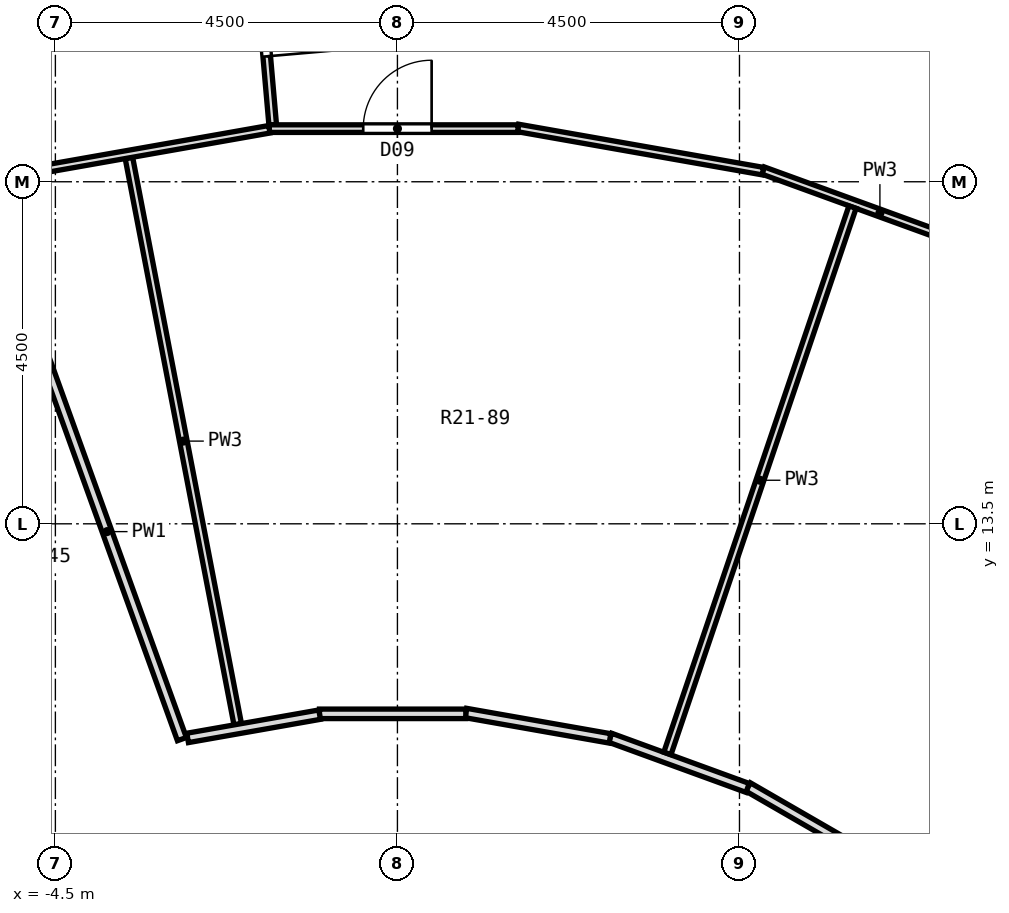
"""IFC4 building model, lengths in metres.
Left out: names, types, materials, properties, quantities, classifications, styles, units other than length and angle.
Written with IfcOpenShell. Run it as: python <this file> out.ifc"""

import sys

from ifc_helpers import new_model, si_unit, direction, frame, frame_2d, origin, place, context, subcontext, project, spatial, rectangle, extrude, element, fill, save


model = new_model("IFC4")
c1 = context("Model", 3, precision=1e-05, world=origin(), true_north=direction((0.0, 1.0)))
c2 = subcontext(c1, "Body", "Model", "MODEL_VIEW")
j1 = project(units=[si_unit("LENGTHUNIT", "METRE"), si_unit("PLANEANGLEUNIT", "RADIAN")], contexts=[c1])
p1 = place(None, origin())
s1 = spatial("IfcSite", under=j1, at=p1, CompositionType="ELEMENT")
p2 = place(p1, origin())
s2 = spatial("IfcBuilding", under=s1, at=p2, CompositionType="ELEMENT")
p3 = place(p2, frame((0.0, 0.0, 131.5)))
s3 = spatial("IfcBuildingStorey", under=s2, at=p3, CompositionType="ELEMENT", Elevation=131.5)
p4 = place(p3, frame((-2.237, 25.567, 0.0), z_axis=(0.0, 0.0, 1.0), x_axis=(0.087068277691, -0.996202346424, 0.0)))
e1 = element("IfcWall", 1, at=p4, inside=s3, PredefinedType="PARTITIONING", context=c2, shape_type="SweptSolid", body=[
    extrude(rectangle(XDim=6.844, YDim=0.1, at=frame_2d((3.422, 0.0))), origin(), (0.0, 0.0, 1.0), 2.8),
])
p5 = place(p4, frame((5.04, 0.0, 0.0)))
e2 = element("IfcOpeningElement", 2, at=p5, cuts=e1, PredefinedType="OPENING", context=c2, shape_type="SweptSolid", body=[
    extrude(rectangle(XDim=0.9, YDim=2.1, at=frame_2d((0.45, 1.05))), frame((0.0, 0.062, 0.0), z_axis=(0.0, -1.0, 0.0), x_axis=(1.0, 0.0, 0.0)), (0.0, 0.0, 1.0), 0.124),
])
p6 = place(p3, frame((-3.532, 18.314, 0.0), z_axis=(0.0, 0.0, 1.0), x_axis=(0.188654052272, -0.982043608279, 0.0)))
e3 = element("IfcWall", 3, at=p6, inside=s3, PredefinedType="PARTITIONING", context=c2, shape_type="SweptSolid", body=[
    extrude(rectangle(XDim=7.587, YDim=0.1, at=frame_2d((3.794, 0.0))), origin(), (0.0, 0.0, 1.0), 2.8),
])
p7 = place(p3, frame((-4.805, 16.127, 0.0), z_axis=(0.0, 0.0, 1.0), x_axis=(0.339327115449, -0.940668437188, 0.0)))
e4 = element("IfcWall", 4, at=p7, inside=s3, PredefinedType="PARTITIONING", context=c2, shape_type="SweptSolid", body=[
    extrude(rectangle(XDim=5.804, YDim=0.125, at=frame_2d((2.902, 0.0))), origin(), (0.0, 0.0, 1.0), 2.8),
])
p8 = place(p3, frame((4.612, 10.039, 0.0), z_axis=(0.0, 0.0, 1.0), x_axis=(0.865978590021, -0.500081075052, 0.0)))
e5 = element("IfcWall", 5, at=p8, inside=s3, PredefinedType="PARTITIONING", context=c2, shape_type="SweptSolid", body=[
    extrude(rectangle(XDim=1.925, YDim=0.125, at=frame_2d((0.962, 0.0))), origin(), (0.0, 0.0, 1.0), 2.8),
])
p9 = place(p3, frame((2.798, 10.686, 0.0), z_axis=(0.0, 0.0, 1.0), x_axis=(0.939367042811, -0.34291334019, 0.0)))
e6 = element("IfcWall", 6, at=p9, inside=s3, PredefinedType="PARTITIONING", context=c2, shape_type="SweptSolid", body=[
    extrude(rectangle(XDim=1.926, YDim=0.125, at=frame_2d((0.963, 0.0))), origin(), (0.0, 0.0, 1.0), 2.8),
])
p10 = place(p3, frame((4.81, 18.148, 0.0), z_axis=(0.0, 0.0, 1.0), x_axis=(0.939747677998, -0.341868836979, 0.0)))
e7 = element("IfcWall", 7, at=p10, inside=s3, PredefinedType="PARTITIONING", context=c2, shape_type="SweptSolid", body=[
    extrude(rectangle(XDim=3.273, YDim=0.1, at=frame_2d((1.636, 0.0))), origin(), (0.0, 0.0, 1.0), 2.8),
])
p11 = place(p3, frame((0.899, 11.011, 0.0), z_axis=(0.0, 0.0, 1.0), x_axis=(0.984830733923, -0.173517795977, 0.0)))
e8 = element("IfcWall", 8, at=p11, inside=s3, PredefinedType="PARTITIONING", context=c2, shape_type="SweptSolid", body=[
    extrude(rectangle(XDim=1.926, YDim=0.125, at=frame_2d((0.963, 0.0))), origin(), (0.0, 0.0, 1.0), 2.8),
])
p12 = place(p3, frame((1.586, 18.708, 0.0), z_axis=(0.0, 0.0, 1.0), x_axis=(0.984816586048, -0.17359807558, 0.0)))
e9 = element("IfcWall", 9, at=p12, inside=s3, PredefinedType="PARTITIONING", context=c2, shape_type="SweptSolid", body=[
    extrude(rectangle(XDim=3.273, YDim=0.1, at=frame_2d((1.636, 0.0))), origin(), (0.0, 0.0, 1.0), 2.8),
])
p13 = place(p3, frame((-1.025, 11.0, 0.0), z_axis=(0.0, 0.0, 1.0), x_axis=(1.0, 0.0, 0.0)))
e10 = element("IfcWall", 10, at=p13, inside=s3, PredefinedType="PARTITIONING", context=c2, shape_type="SweptSolid", body=[
    extrude(rectangle(XDim=1.925, YDim=0.125, at=frame_2d((0.962, 0.0))), origin(), (0.0, 0.0, 1.0), 2.8),
])
p14 = place(p3, frame((-1.687, 18.699, 0.0), z_axis=(0.0, 0.0, 1.0), x_axis=(1.0, 0.0, 0.0)))
e11 = element("IfcWall", 11, at=p14, inside=s3, PredefinedType="PARTITIONING", context=c2, shape_type="SweptSolid", body=[
    extrude(rectangle(XDim=3.273, YDim=0.1, at=frame_2d((1.636, 0.0))), origin(), (0.0, 0.0, 1.0), 2.8),
])
p15 = place(p14, frame((1.237, 0.0, 0.0)))
e12 = element("IfcOpeningElement", 12, at=p15, cuts=e11, PredefinedType="OPENING", context=c2, shape_type="SweptSolid", body=[
    extrude(rectangle(XDim=0.9, YDim=2.1, at=frame_2d((0.45, 1.05))), frame((0.0, 0.062, 0.0), z_axis=(0.0, -1.0, 0.0), x_axis=(1.0, 0.0, 0.0)), (0.0, 0.0, 1.0), 0.124),
])
p16 = place(p3, frame((-2.76, 10.683, 0.0), z_axis=(0.0, 0.0, 1.0), x_axis=(0.98482115855, 0.173572133917, 0.0)))
e13 = element("IfcWall", 13, at=p16, inside=s3, PredefinedType="PARTITIONING", context=c2, shape_type="SweptSolid", body=[
    extrude(rectangle(XDim=1.764, YDim=0.125, at=frame_2d((0.882, 0.0))), origin(), (0.0, 0.0, 1.0), 2.8),
])
p17 = place(p3, frame((-4.908, 18.122, 0.0), z_axis=(0.0, 0.0, 1.0), x_axis=(0.984801579175, 0.1736831876, 0.0)))
e14 = element("IfcWall", 14, at=p17, inside=s3, PredefinedType="PARTITIONING", context=c2, shape_type="SweptSolid", body=[
    extrude(rectangle(XDim=3.272, YDim=0.1, at=frame_2d((1.636, 0.0))), origin(), (0.0, 0.0, 1.0), 2.8),
])
p18 = place(p3, frame((3.552, 10.48, 0.0), z_axis=(0.0, 0.0, 1.0), x_axis=(0.320895480421, 0.947114613257, 0.0)))
e15 = element("IfcWall", 15, at=p18, inside=s3, PredefinedType="PARTITIONING", context=c2, shape_type="SweptSolid", body=[
    extrude(rectangle(XDim=7.588, YDim=0.1, at=frame_2d((3.794, 0.0))), origin(), (0.0, 0.0, 1.0), 2.8),
])
p19 = place(p15, origin())
e16 = element("IfcDoor", 16, at=p19, inside=s3, OperationType="SINGLE_SWING_RIGHT", PredefinedType="DOOR", context=c2, shape_type="SweptSolid", body=[
    extrude(rectangle(XDim=0.9, YDim=2.1, at=frame_2d((0.45, 1.05))), frame((0.0, 0.025, 0.0), z_axis=(0.0, -1.0, 0.0), x_axis=(1.0, 0.0, 0.0)), (0.0, 0.0, 1.0), 0.05),
])
fill(e12, e16)
p20 = place(p5, origin())
e17 = element("IfcDoor", 17, at=p20, inside=s3, OperationType="SINGLE_SWING_RIGHT", PredefinedType="DOOR", context=c2, shape_type="SweptSolid", body=[
    extrude(rectangle(XDim=0.9, YDim=2.1, at=frame_2d((0.45, 1.05))), frame((0.0, 0.025, 0.0), z_axis=(0.0, -1.0, 0.0), x_axis=(1.0, 0.0, 0.0)), (0.0, 0.0, 1.0), 0.05),
])
fill(e2, e17)
save(model, sys.argv[1])
